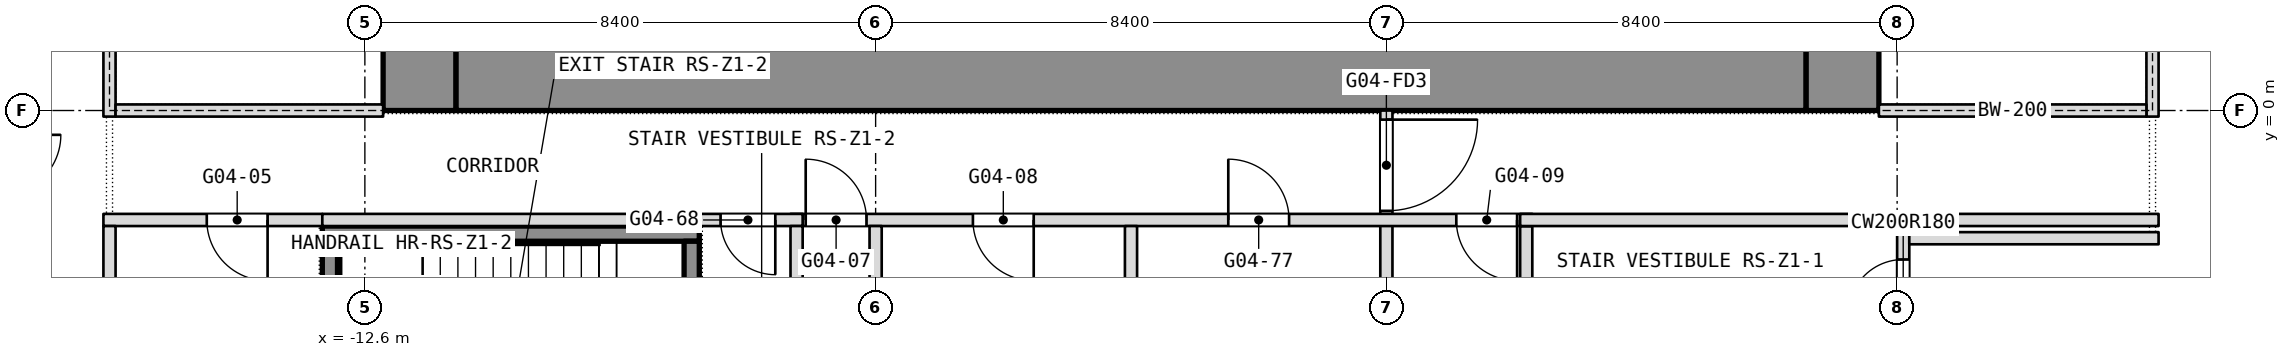
"""IFC4 building model, lengths in metres.
Left out: names, types, materials, properties, quantities, classifications, styles, units other than length and angle.
Written with IfcOpenShell. Run it as: python <this file> out.ifc"""

import sys

from ifc_helpers import new_model, si_unit, direction, frame, frame_2d, origin, place, context, subcontext, project, spatial, rectangle, extrude, element, fill, save


model = new_model("IFC4")
c1 = context("Model", 3, precision=1e-05, world=origin(), true_north=direction((0.0, 1.0)))
c2 = subcontext(c1, "Body", "Model", "MODEL_VIEW")
j1 = project(units=[si_unit("LENGTHUNIT", "METRE"), si_unit("PLANEANGLEUNIT", "RADIAN")], contexts=[c1])
p1 = place(None, origin())
s1 = spatial("IfcSite", under=j1, at=p1, CompositionType="ELEMENT")
p2 = place(p1, origin())
s2 = spatial("IfcBuilding", under=s1, at=p2, CompositionType="ELEMENT")
p3 = place(p2, frame((0.0, 0.0, 54.5)))
s3 = spatial("IfcBuildingStorey", under=s2, at=p3, CompositionType="ELEMENT", Elevation=54.5)
p4 = place(p3, frame((11.7, 0.0, 0.0), z_axis=(0.0, 0.0, 1.0), x_axis=(0.0, 1.0, 0.0)))
e1 = element("IfcWall", 1, at=p4, inside=s3, PredefinedType="SHEAR", context=c2, shape_type="SweptSolid", body=[
    extrude(rectangle(XDim=16.8, YDim=1.2, at=frame_2d((8.4, 0.0))), origin(), (0.0, 0.0, 1.0), 3.6),
])
p5 = place(p4, frame((3.6, 0.0, 0.0)))
e2 = element("IfcOpeningElement", 2, at=p5, cuts=e1, PredefinedType="OPENING", context=c2, shape_type="SweptSolid", body=[
    extrude(rectangle(XDim=0.9, YDim=2.1, at=frame_2d((0.45, 1.05))), frame((0.0, 0.6, 0.0), z_axis=(0.0, -1.0, 0.0), x_axis=(1.0, 0.0, 0.0)), (0.0, 0.0, 1.0), 1.2),
])
p6 = place(p4, frame((6.825, 0.0, 0.0)))
e3 = element("IfcOpeningElement", 3, at=p6, cuts=e1, PredefinedType="OPENING", context=c2, shape_type="SweptSolid", body=[
    extrude(rectangle(XDim=1.2, YDim=2.1, at=frame_2d((0.6, 1.05))), frame((0.0, 0.6, 0.0), z_axis=(0.0, -1.0, 0.0), x_axis=(1.0, 0.0, 0.0)), (0.0, 0.0, 1.0), 1.2),
])
p7 = place(p4, frame((12.3, 0.0, 0.0)))
e4 = element("IfcOpeningElement", 4, at=p7, cuts=e1, PredefinedType="OPENING", context=c2, shape_type="SweptSolid", body=[
    extrude(rectangle(XDim=0.9, YDim=2.1, at=frame_2d((0.45, 1.05))), frame((0.0, 0.6, 0.0), z_axis=(0.0, -1.0, 0.0), x_axis=(1.0, 0.0, 0.0)), (0.0, 0.0, 1.0), 1.2),
])
p8 = place(p4, frame((8.775, 0.0, 0.0)))
e5 = element("IfcOpeningElement", 5, at=p8, cuts=e1, PredefinedType="OPENING", context=c2, shape_type="SweptSolid", body=[
    extrude(rectangle(XDim=1.2, YDim=2.1, at=frame_2d((0.6, 1.05))), frame((0.0, 0.6, 0.0), z_axis=(0.0, -1.0, 0.0), x_axis=(1.0, 0.0, 0.0)), (0.0, 0.0, 1.0), 1.2),
])
p9 = place(p3, frame((-11.7, 0.0, 0.0), z_axis=(0.0, 0.0, 1.0), x_axis=(0.0, 1.0, 0.0)))
e6 = element("IfcWall", 6, at=p9, inside=s3, PredefinedType="SHEAR", context=c2, shape_type="SweptSolid", body=[
    extrude(rectangle(XDim=16.8, YDim=1.2, at=frame_2d((8.4, 0.0))), origin(), (0.0, 0.0, 1.0), 3.6),
])
p10 = place(p9, frame((2.3, 0.0, 0.0)))
e7 = element("IfcOpeningElement", 7, at=p10, cuts=e6, PredefinedType="OPENING", context=c2, shape_type="SweptSolid", body=[
    extrude(rectangle(XDim=1.1, YDim=2.1, at=frame_2d((0.55, 1.05))), frame((0.0, 0.6, 0.0), z_axis=(0.0, -1.0, 0.0), x_axis=(1.0, 0.0, 0.0)), (0.0, 0.0, 1.0), 1.2),
])
p11 = place(p9, frame((4.85, 0.0, 0.0)))
e8 = element("IfcOpeningElement", 8, at=p11, cuts=e6, PredefinedType="OPENING", context=c2, shape_type="SweptSolid", body=[
    extrude(rectangle(XDim=1.1, YDim=2.1, at=frame_2d((0.55, 1.05))), frame((0.0, 0.6, 0.0), z_axis=(0.0, -1.0, 0.0), x_axis=(1.0, 0.0, 0.0)), (0.0, 0.0, 1.0), 1.2),
])
p12 = place(p9, frame((6.825, 0.0, 0.0)))
e9 = element("IfcOpeningElement", 9, at=p12, cuts=e6, PredefinedType="OPENING", context=c2, shape_type="SweptSolid", body=[
    extrude(rectangle(XDim=1.2, YDim=2.1, at=frame_2d((0.6, 1.05))), frame((0.0, 0.6, 0.0), z_axis=(0.0, -1.0, 0.0), x_axis=(1.0, 0.0, 0.0)), (0.0, 0.0, 1.0), 1.2),
])
p13 = place(p9, frame((13.4, 0.0, 0.0)))
e10 = element("IfcOpeningElement", 10, at=p13, cuts=e6, PredefinedType="OPENING", context=c2, shape_type="SweptSolid", body=[
    extrude(rectangle(XDim=1.1, YDim=2.1, at=frame_2d((0.55, 1.05))), frame((0.0, 0.6, 0.0), z_axis=(0.0, -1.0, 0.0), x_axis=(1.0, 0.0, 0.0)), (0.0, 0.0, 1.0), 1.2),
])
p14 = place(p9, frame((10.85, 0.0, 0.0)))
e11 = element("IfcOpeningElement", 11, at=p14, cuts=e6, PredefinedType="OPENING", context=c2, shape_type="SweptSolid", body=[
    extrude(rectangle(XDim=1.1, YDim=2.1, at=frame_2d((0.55, 1.05))), frame((0.0, 0.6, 0.0), z_axis=(0.0, -1.0, 0.0), x_axis=(1.0, 0.0, 0.0)), (0.0, 0.0, 1.0), 1.2),
])
p15 = place(p9, frame((8.775, 0.0, 0.0)))
e12 = element("IfcOpeningElement", 12, at=p15, cuts=e6, PredefinedType="OPENING", context=c2, shape_type="SweptSolid", body=[
    extrude(rectangle(XDim=1.2, YDim=2.1, at=frame_2d((0.6, 1.05))), frame((0.0, 0.6, 0.0), z_axis=(0.0, -1.0, 0.0), x_axis=(1.0, 0.0, 0.0)), (0.0, 0.0, 1.0), 1.2),
])
p16 = place(p3, frame((-11.1, 0.6, 0.0), z_axis=(0.0, 0.0, 1.0), x_axis=(1.0, 0.0, 0.0)))
e13 = element("IfcWall", 13, at=p16, inside=s3, PredefinedType="SHEAR", context=c2, shape_type="SweptSolid", body=[
    extrude(rectangle(XDim=22.2, YDim=1.2, at=frame_2d((11.1, 0.0))), origin(), (0.0, 0.0, 1.0), 3.6),
])
p17 = place(p3, frame((12.7, -3.7, 0.0), z_axis=(0.0, 0.0, 1.0), x_axis=(0.0, 1.0, 0.0)))
e14 = element("IfcWall", 14, at=p17, inside=s3, PredefinedType="PARTITIONING", context=c2, shape_type="SweptSolid", body=[
    extrude(rectangle(XDim=1.7, YDim=0.2, at=frame_2d((0.85, 0.0))), origin(), (0.0, 0.0, 1.0), 3.34),
])
p18 = place(p17, frame((0.35, 0.0, 0.0)))
e15 = element("IfcOpeningElement", 15, at=p18, cuts=e14, PredefinedType="OPENING", context=c2, shape_type="SweptSolid", body=[
    extrude(rectangle(XDim=0.9, YDim=2.1, at=frame_2d((0.45, 1.05))), frame((0.0, 0.1, 0.0), z_axis=(0.0, -1.0, 0.0), x_axis=(1.0, 0.0, 0.0)), (0.0, 0.0, 1.0), 0.2),
])
p19 = place(p3, frame((6.5, -3.7, 0.0), z_axis=(0.0, 0.0, 1.0), x_axis=(0.0, 1.0, 0.0)))
e16 = element("IfcWall", 16, at=p19, inside=s3, PredefinedType="PARTITIONING", context=c2, shape_type="SweptSolid", body=[
    extrude(rectangle(XDim=1.8, YDim=0.2, at=frame_2d((0.9, 0.0))), origin(), (0.0, 0.0, 1.0), 3.34),
])
p20 = place(p3, frame((4.2, -12.7, 0.0), z_axis=(0.0, 0.0, 1.0), x_axis=(0.0, 1.0, 0.0)))
e17 = element("IfcWall", 17, at=p20, inside=s3, PredefinedType="PARTITIONING", context=c2, shape_type="SweptSolid", body=[
    extrude(rectangle(XDim=12.7, YDim=0.2, at=frame_2d((6.35, 0.0))), origin(), (0.0, 0.0, 1.0), 3.34),
])
p21 = place(p20, frame((11.05, 0.0, 0.0)))
e18 = element("IfcOpeningElement", 18, at=p21, cuts=e17, PredefinedType="OPENING", context=c2, shape_type="SweptSolid", body=[
    extrude(rectangle(XDim=1.5, YDim=2.1, at=frame_2d((0.75, 1.05))), frame((0.0, 0.1, 0.0), z_axis=(0.0, -1.0, 0.0), x_axis=(1.0, 0.0, 0.0)), (0.0, 0.0, 1.0), 0.2),
])
p22 = place(p20, frame((0.25, 0.0, 0.0)))
e19 = element("IfcOpeningElement", 19, at=p22, cuts=e17, PredefinedType="OPENING", context=c2, shape_type="SweptSolid", body=[
    extrude(rectangle(XDim=1.5, YDim=2.1, at=frame_2d((0.75, 1.05))), frame((0.0, 0.1, 0.0), z_axis=(0.0, -1.0, 0.0), x_axis=(1.0, 0.0, 0.0)), (0.0, 0.0, 1.0), 0.2),
])
p23 = place(p3, frame((12.8, -2.1, 0.0), z_axis=(0.0, 0.0, 1.0), x_axis=(1.0, 0.0, 0.0)))
e20 = element("IfcWall", 20, at=p23, inside=s3, PredefinedType="PARTITIONING", context=c2, shape_type="SweptSolid", body=[
    extrude(rectangle(XDim=4.1, YDim=0.2, at=frame_2d((2.05, 0.0))), origin(), (0.0, 0.0, 1.0), 3.34),
])
p24 = place(p3, frame((-16.9, -1.8, 0.0), z_axis=(0.0, 0.0, 1.0), x_axis=(1.0, 0.0, 0.0)))
e21 = element("IfcWall", 21, at=p24, inside=s3, PredefinedType="PARTITIONING", context=c2, shape_type="SweptSolid", body=[
    extrude(rectangle(XDim=3.6, YDim=0.2, at=frame_2d((1.8, 0.0))), origin(), (0.0, 0.0, 1.0), 3.34),
])
p25 = place(p24, frame((1.7, 0.0, 0.0)))
e22 = element("IfcOpeningElement", 22, at=p25, cuts=e21, PredefinedType="OPENING", context=c2, shape_type="SweptSolid", body=[
    extrude(rectangle(XDim=1.0, YDim=2.1, at=frame_2d((0.5, 1.05))), frame((0.0, 0.1, 0.0), z_axis=(0.0, -1.0, 0.0), x_axis=(1.0, 0.0, 0.0)), (0.0, 0.0, 1.0), 0.2),
])
p26 = place(p3, frame((-5.6, -1.8, 0.0), z_axis=(0.0, 0.0, 1.0), x_axis=(1.0, 0.0, 0.0)))
e23 = element("IfcWall", 23, at=p26, inside=s3, PredefinedType="PARTITIONING", context=c2, shape_type="SweptSolid", body=[
    extrude(rectangle(XDim=12.2, YDim=0.2, at=frame_2d((6.1, 0.0))), origin(), (0.0, 0.0, 1.0), 3.34),
])
p27 = place(p26, frame((0.25, 0.0, 0.0)))
e24 = element("IfcOpeningElement", 24, at=p27, cuts=e23, PredefinedType="OPENING", context=c2, shape_type="SweptSolid", body=[
    extrude(rectangle(XDim=1.0, YDim=2.1, at=frame_2d((0.5, 1.05))), frame((0.0, 0.1, 0.0), z_axis=(0.0, -1.0, 0.0), x_axis=(1.0, 0.0, 0.0)), (0.0, 0.0, 1.0), 0.2),
])
p28 = place(p26, frame((3.0, 0.0, 0.0)))
e25 = element("IfcOpeningElement", 25, at=p28, cuts=e23, PredefinedType="OPENING", context=c2, shape_type="SweptSolid", body=[
    extrude(rectangle(XDim=1.0, YDim=2.1, at=frame_2d((0.5, 1.05))), frame((0.0, 0.1, 0.0), z_axis=(0.0, -1.0, 0.0), x_axis=(1.0, 0.0, 0.0)), (0.0, 0.0, 1.0), 0.2),
])
p29 = place(p26, frame((10.95, 0.0, 0.0)))
e26 = element("IfcOpeningElement", 26, at=p29, cuts=e23, PredefinedType="OPENING", context=c2, shape_type="SweptSolid", body=[
    extrude(rectangle(XDim=1.0, YDim=2.1, at=frame_2d((0.5, 1.05))), frame((0.0, 0.1, 0.0), z_axis=(0.0, -1.0, 0.0), x_axis=(1.0, 0.0, 0.0)), (0.0, 0.0, 1.0), 0.2),
])
p30 = place(p26, frame((7.2, 0.0, 0.0)))
e27 = element("IfcOpeningElement", 27, at=p30, cuts=e23, PredefinedType="OPENING", context=c2, shape_type="SweptSolid", body=[
    extrude(rectangle(XDim=1.0, YDim=2.1, at=frame_2d((0.5, 1.05))), frame((0.0, 0.1, 0.0), z_axis=(0.0, -1.0, 0.0), x_axis=(1.0, 0.0, 0.0)), (0.0, 0.0, 1.0), 0.2),
])
p31 = place(p3, frame((-13.3, -1.8, 0.0), z_axis=(0.0, 0.0, 1.0), x_axis=(1.0, 0.0, 0.0)))
e28 = element("IfcWall", 28, at=p31, inside=s3, PredefinedType="PARTITIONING", context=c2, shape_type="SweptSolid", body=[
    extrude(rectangle(XDim=7.9, YDim=0.2, at=frame_2d((3.95, 0.0))), origin(), (0.0, 0.0, 1.0), 3.34),
])
p32 = place(p31, frame((6.55, 0.0, 0.0)))
e29 = element("IfcOpeningElement", 29, at=p32, cuts=e28, PredefinedType="OPENING", context=c2, shape_type="SweptSolid", body=[
    extrude(rectangle(XDim=0.9, YDim=2.1, at=frame_2d((0.45, 1.05))), frame((0.0, 0.1, 0.0), z_axis=(0.0, -1.0, 0.0), x_axis=(1.0, 0.0, 0.0)), (0.0, 0.0, 1.0), 0.2),
])
p33 = place(p3, frame((6.4, -1.8, 0.0), z_axis=(0.0, 0.0, 1.0), x_axis=(1.0, 0.0, 0.0)))
e30 = element("IfcWall", 30, at=p33, inside=s3, PredefinedType="PARTITIONING", context=c2, shape_type="SweptSolid", body=[
    extrude(rectangle(XDim=10.5, YDim=0.2, at=frame_2d((5.25, 0.0))), origin(), (0.0, 0.0, 1.0), 3.34),
])
for number, where, z_axis, x_axis in (
    (31, (0.0, -10.7, 0.0), (0.0, 0.0, 1.0), (0.0, 1.0, 0.0)),
    (32, (-4.2, -10.7, 0.0), (0.0, 0.0, 1.0), (0.0, 1.0, 0.0)),
):
    element("IfcWall", number, at=place(p3, frame(where, z_axis=z_axis, x_axis=x_axis)), inside=s3, PredefinedType="PARTITIONING", context=c2, shape_type="SweptSolid", body=[
        extrude(rectangle(XDim=8.8, YDim=0.2, at=frame_2d((4.4, 0.0))), origin(), (0.0, 0.0, 1.0), 3.34),
    ])
p34 = place(p3, frame((-5.5, -5.2, 0.0), z_axis=(0.0, 0.0, 1.0), x_axis=(0.0, 1.0, 0.0)))
e33 = element("IfcWall", 33, at=p34, inside=s3, PredefinedType="PARTITIONING", context=c2, shape_type="SweptSolid", body=[
    extrude(rectangle(XDim=3.3, YDim=0.2, at=frame_2d((1.65, 0.0))), origin(), (0.0, 0.0, 1.0), 3.34),
])
p35 = place(p3, frame((-16.8, -10.9, 0.0), z_axis=(0.0, 0.0, 1.0), x_axis=(0.0, 1.0, 0.0)))
e34 = element("IfcWall", 34, at=p35, inside=s3, PredefinedType="PARTITIONING", context=c2, shape_type="SweptSolid", body=[
    extrude(rectangle(XDim=9.0, YDim=0.2, at=frame_2d((4.5, 0.0))), origin(), (0.0, 0.0, 1.0), 3.34),
])
p36 = place(p3, frame((-16.8, -0.1, 0.0), z_axis=(0.0, 0.0, 1.0), x_axis=(0.0, 1.0, 0.0)))
e35 = element("IfcWall", 35, at=p36, inside=s3, PredefinedType="PARTITIONING", context=c2, shape_type="SweptSolid", body=[
    extrude(rectangle(XDim=17.0, YDim=0.2, at=frame_2d((8.5, 0.0))), origin(), (0.0, 0.0, 1.0), 3.34),
])
p37 = place(p36, frame((2.2, 0.0, 0.0)))
e36 = element("IfcOpeningElement", 36, at=p37, cuts=e35, PredefinedType="OPENING", context=c2, shape_type="SweptSolid", body=[
    extrude(rectangle(XDim=1.8, YDim=2.1, at=frame_2d((0.9, 1.05))), frame((0.0, 0.1, 0.0), z_axis=(0.0, -1.0, 0.0), x_axis=(1.0, 0.0, 0.0)), (0.0, 0.0, 1.0), 0.2),
])
p38 = place(p36, frame((7.2, 0.0, 0.0)))
e37 = element("IfcOpeningElement", 37, at=p38, cuts=e35, PredefinedType="OPENING", context=c2, shape_type="SweptSolid", body=[
    extrude(rectangle(XDim=1.8, YDim=2.1, at=frame_2d((0.9, 1.05))), frame((0.0, 0.1, 0.0), z_axis=(0.0, -1.0, 0.0), x_axis=(1.0, 0.0, 0.0)), (0.0, 0.0, 1.0), 0.2),
])
p39 = place(p3, frame((-16.7, 0.0, 0.0), z_axis=(0.0, 0.0, 1.0), x_axis=(1.0, 0.0, 0.0)))
e38 = element("IfcWall", 38, at=p39, inside=s3, PredefinedType="PARTITIONING", context=c2, shape_type="SweptSolid", body=[
    extrude(rectangle(XDim=4.4, YDim=0.2, at=frame_2d((2.2, 0.0))), origin(), (0.0, 0.0, 1.0), 2.84),
])
p40 = place(p3, frame((16.8, -0.1, 0.0), z_axis=(0.0, 0.0, 1.0), x_axis=(0.0, 1.0, 0.0)))
e39 = element("IfcWall", 39, at=p40, inside=s3, PredefinedType="PARTITIONING", context=c2, shape_type="SweptSolid", body=[
    extrude(rectangle(XDim=17.0, YDim=0.2, at=frame_2d((8.5, 0.0))), origin(), (0.0, 0.0, 1.0), 3.34),
])
p41 = place(p40, frame((2.2, 0.0, 0.0)))
e40 = element("IfcOpeningElement", 40, at=p41, cuts=e39, PredefinedType="OPENING", context=c2, shape_type="SweptSolid", body=[
    extrude(rectangle(XDim=1.8, YDim=2.1, at=frame_2d((0.9, 1.05))), frame((0.0, 0.1, 0.0), z_axis=(0.0, -1.0, 0.0), x_axis=(1.0, 0.0, 0.0)), (0.0, 0.0, 1.0), 0.2),
])
p42 = place(p40, frame((13.0, 0.0, 0.0)))
e41 = element("IfcOpeningElement", 41, at=p42, cuts=e39, PredefinedType="OPENING", context=c2, shape_type="SweptSolid", body=[
    extrude(rectangle(XDim=1.8, YDim=2.1, at=frame_2d((0.9, 1.05))), frame((0.0, 0.1, 0.0), z_axis=(0.0, -1.0, 0.0), x_axis=(1.0, 0.0, 0.0)), (0.0, 0.0, 1.0), 0.2),
])
p43 = place(p3, frame((12.3, 0.0, 0.0), z_axis=(0.0, 0.0, 1.0), x_axis=(1.0, 0.0, 0.0)))
e42 = element("IfcWall", 42, at=p43, inside=s3, PredefinedType="PARTITIONING", context=c2, shape_type="SweptSolid", body=[
    extrude(rectangle(XDim=4.4, YDim=0.2, at=frame_2d((2.2, 0.0))), origin(), (0.0, 0.0, 1.0), 2.84),
])
p44 = place(p3, frame((-13.3, -2.025, 0.1), z_axis=(0.0, 0.0, 1.0), x_axis=(1.0, 0.0, 0.0)))
e43 = element("IfcWall", 43, at=p44, inside=s3, PredefinedType="SHEAR", context=c2, shape_type="SweptSolid", body=[
    extrude(rectangle(XDim=6.2, YDim=0.25, at=frame_2d((3.1, 0.0))), origin(), (0.0, 0.0, 1.0), 3.6),
])
p45 = place(p3, frame((-13.175, -5.05, 0.1), z_axis=(0.0, 0.0, 1.0), x_axis=(0.0, 1.0, 0.0)))
e44 = element("IfcWall", 44, at=p45, inside=s3, PredefinedType="SHEAR", context=c2, shape_type="SweptSolid", body=[
    extrude(rectangle(XDim=2.9, YDim=0.25, at=frame_2d((1.45, 0.0))), origin(), (0.0, 0.0, 1.0), 3.6),
])
p46 = place(p3, frame((-7.225, -5.05, 0.1), z_axis=(0.0, 0.0, 1.0), x_axis=(0.0, 1.0, 0.0)))
e45 = element("IfcWall", 45, at=p46, inside=s3, PredefinedType="SHEAR", context=c2, shape_type="SweptSolid", body=[
    extrude(rectangle(XDim=2.9, YDim=0.25, at=frame_2d((1.45, 0.0))), origin(), (0.0, 0.0, 1.0), 3.6),
])
p47 = place(p46, frame((0.95, 0.0, 0.0)))
e46 = element("IfcOpeningElement", 46, at=p47, cuts=e45, PredefinedType="OPENING", context=c2, shape_type="SweptSolid", body=[
    extrude(rectangle(XDim=1.0, YDim=2.1, at=frame_2d((0.5, 1.05))), frame((0.0, 0.125, 0.0), z_axis=(0.0, -1.0, 0.0), x_axis=(1.0, 0.0, 0.0)), (0.0, 0.0, 1.0), 0.25),
])
p48 = place(p18, origin())
e47 = element("IfcDoor", 47, at=p48, inside=s3, OperationType="SINGLE_SWING_RIGHT", PredefinedType="DOOR", context=c2, shape_type="SweptSolid", body=[
    extrude(rectangle(XDim=0.9, YDim=2.1, at=frame_2d((0.45, 1.05))), frame((0.0, 0.025, 0.0), z_axis=(0.0, -1.0, 0.0), x_axis=(1.0, 0.0, 0.0)), (0.0, 0.0, 1.0), 0.05),
])
fill(e15, e47)
p49 = place(p25, origin())
e48 = element("IfcDoor", 48, at=p49, inside=s3, OperationType="SINGLE_SWING_RIGHT", PredefinedType="DOOR", context=c2, shape_type="SweptSolid", body=[
    extrude(rectangle(XDim=1.0, YDim=2.1, at=frame_2d((0.5, 1.05))), frame((0.0, 0.025, 0.0), z_axis=(0.0, -1.0, 0.0), x_axis=(1.0, 0.0, 0.0)), (0.0, 0.0, 1.0), 0.05),
])
fill(e22, e48)
p50 = place(p27, origin())
e49 = element("IfcDoor", 49, at=p50, inside=s3, OperationType="SINGLE_SWING_RIGHT", PredefinedType="DOOR", context=c2, shape_type="SweptSolid", body=[
    extrude(rectangle(XDim=1.0, YDim=2.1, at=frame_2d((0.5, 1.05))), frame((0.0, 0.025, 0.0), z_axis=(0.0, -1.0, 0.0), x_axis=(1.0, 0.0, 0.0)), (0.0, 0.0, 1.0), 0.05),
])
fill(e24, e49)
p51 = place(p28, origin())
e50 = element("IfcDoor", 50, at=p51, inside=s3, OperationType="SINGLE_SWING_LEFT", PredefinedType="DOOR", context=c2, shape_type="SweptSolid", body=[
    extrude(rectangle(XDim=1.0, YDim=2.1, at=frame_2d((0.5, 1.05))), frame((0.0, 0.025, 0.0), z_axis=(0.0, -1.0, 0.0), x_axis=(1.0, 0.0, 0.0)), (0.0, 0.0, 1.0), 0.05),
])
fill(e25, e50)
p52 = place(p29, origin())
e51 = element("IfcDoor", 51, at=p52, inside=s3, OperationType="SINGLE_SWING_RIGHT", PredefinedType="DOOR", context=c2, shape_type="SweptSolid", body=[
    extrude(rectangle(XDim=1.0, YDim=2.1, at=frame_2d((0.5, 1.05))), frame((0.0, 0.025, 0.0), z_axis=(0.0, -1.0, 0.0), x_axis=(1.0, 0.0, 0.0)), (0.0, 0.0, 1.0), 0.05),
])
fill(e26, e51)
p53 = place(p30, origin())
e52 = element("IfcDoor", 52, at=p53, inside=s3, OperationType="SINGLE_SWING_RIGHT", PredefinedType="DOOR", context=c2, shape_type="SweptSolid", body=[
    extrude(rectangle(XDim=1.0, YDim=2.1, at=frame_2d((0.5, 1.05))), frame((0.0, 0.025, 0.0), z_axis=(0.0, -1.0, 0.0), x_axis=(1.0, 0.0, 0.0)), (0.0, 0.0, 1.0), 0.05),
])
fill(e27, e52)
p54 = place(p32, origin())
e53 = element("IfcDoor", 53, at=p54, inside=s3, OperationType="SINGLE_SWING_LEFT", PredefinedType="DOOR", context=c2, shape_type="SweptSolid", body=[
    extrude(rectangle(XDim=0.9, YDim=2.1, at=frame_2d((0.45, 1.05))), frame((0.0, 0.025, 0.0), z_axis=(0.0, -1.0, 0.0), x_axis=(1.0, 0.0, 0.0)), (0.0, 0.0, 1.0), 0.05),
])
fill(e29, e53)
p55 = place(p21, origin())
e54 = element("IfcDoor", 54, at=p55, inside=s3, OperationType="DOUBLE_DOOR_DOUBLE_SWING", PredefinedType="DOOR", context=c2, shape_type="SweptSolid", body=[
    extrude(rectangle(XDim=1.5, YDim=2.1, at=frame_2d((0.75, 1.05))), frame((0.0, 0.025, 0.0), z_axis=(0.0, -1.0, 0.0), x_axis=(1.0, 0.0, 0.0)), (0.0, 0.0, 1.0), 0.05),
])
fill(e18, e54)
save(model, sys.argv[1])
